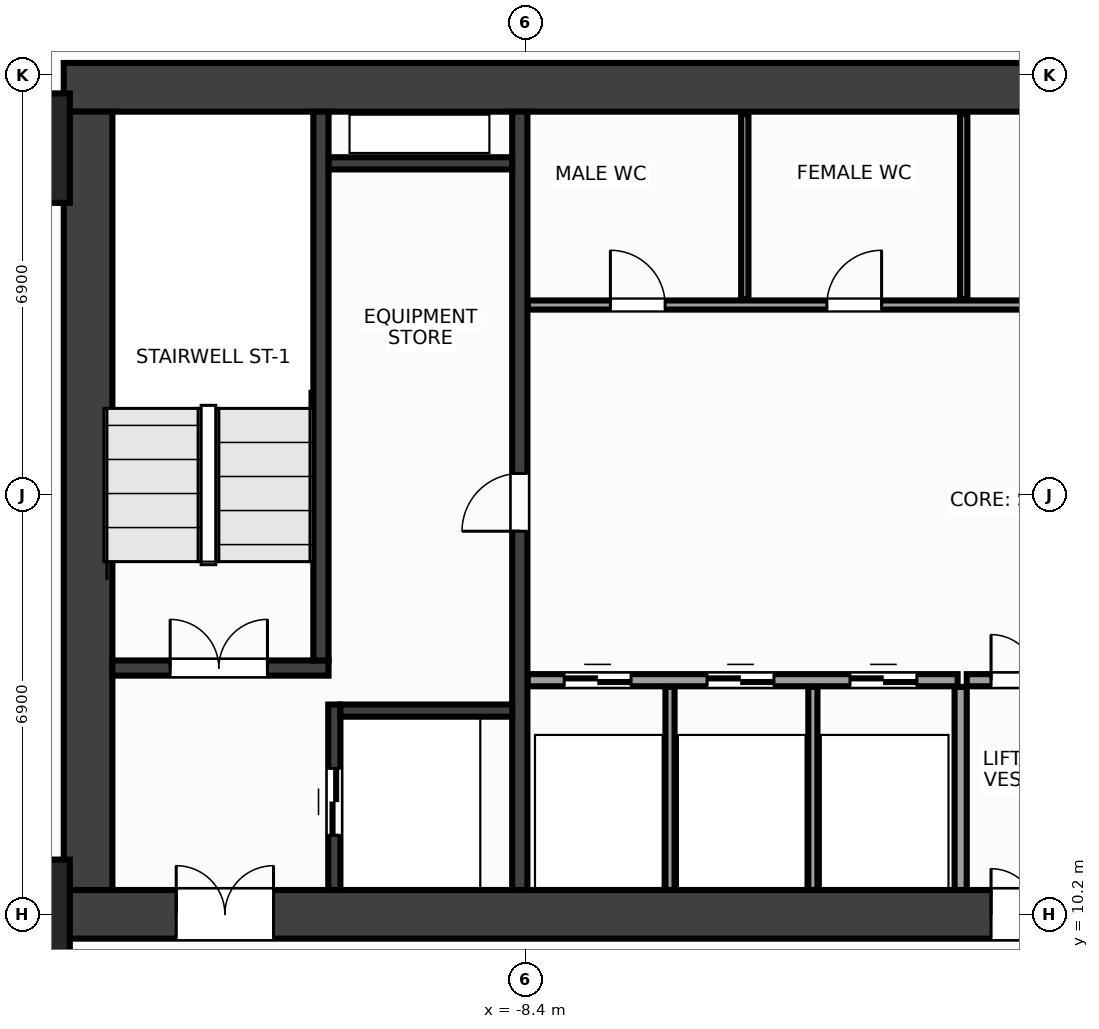
"""IFC4 building model, lengths in metres.
Left out: names, types, materials, properties, quantities, classifications, styles, units other than length and angle.
Written with IfcOpenShell. Run it as: python <this file> out.ifc"""

import sys

from ifc_helpers import new_model, si_unit, direction, frame, frame_2d, origin, origin_2d, place, context, subcontext, project, spatial, rectangle, extrude, source, transform, mapped, element, fill, save


model = new_model("IFC4")
c1 = context("Model", 3, precision=1e-05, world=origin(), true_north=direction((0.0, 1.0)))
c2 = subcontext(c1, "Body", "Model", "MODEL_VIEW")
j1 = project(units=[si_unit("LENGTHUNIT", "METRE"), si_unit("PLANEANGLEUNIT", "RADIAN")], contexts=[c1])
p1 = place(None, origin())
s1 = spatial("IfcSite", under=j1, at=p1, CompositionType="ELEMENT")
p2 = place(p1, origin())
s2 = spatial("IfcBuilding", under=s1, at=p2, CompositionType="ELEMENT")
p3 = place(p2, frame((0.0, 0.0, 27.2)))
s3 = spatial("IfcBuildingStorey", under=s2, at=p3, CompositionType="ELEMENT", Elevation=27.2)
m1 = source(origin(), c2, "Body", "SweptSolid", [
    extrude(rectangle(XDim=32.0, YDim=0.8, at=frame_2d((16.0, 0.0))), origin(), (0.0, 0.0, 1.0), 3.6),
])
p4 = place(p3, frame((-16.0, 23.8, 0.0), z_axis=(0.0, 0.0, 1.0), x_axis=(1.0, 0.0, 0.0)))
e1 = element("IfcWall", 1, at=p4, inside=s3, PredefinedType="SHEAR", context=c2, shape_type="MappedRepresentation", body=[
    mapped(m1, transform((0.0, 0.0, 0.0), x_axis=(1.0, 0.0, 0.0), y_axis=(0.0, 1.0, 0.0), z_axis=(0.0, 0.0, 1.0), scale=1.0)),
])
p5 = place(p3, frame((-16.0, 10.2, 0.0), z_axis=(0.0, 0.0, 1.0), x_axis=(1.0, 0.0, 0.0)))
e2 = element("IfcWall", 2, at=p5, inside=s3, PredefinedType="SHEAR", context=c2, shape_type="MappedRepresentation", body=[
    mapped(m1, transform((0.0, 0.0, 0.0), x_axis=(1.0, 0.0, 0.0), y_axis=(0.0, 1.0, 0.0), z_axis=(0.0, 0.0, 1.0), scale=1.0)),
])
p6 = place(p5, frame((1.85, 0.0, 0.0)))
e3 = element("IfcOpeningElement", 3, at=p6, cuts=e2, PredefinedType="OPENING", context=c2, shape_type="SweptSolid", body=[
    extrude(rectangle(XDim=1.6, YDim=2.15, at=frame_2d((0.8, 1.075))), frame((0.0, 0.412, 0.0), z_axis=(0.0, -1.0, 0.0), x_axis=(1.0, 0.0, 0.0)), (0.0, 0.0, 1.0), 0.824),
])
p7 = place(p5, frame((28.55, 0.0, 0.0)))
e4 = element("IfcOpeningElement", 4, at=p7, cuts=e2, PredefinedType="OPENING", context=c2, shape_type="SweptSolid", body=[
    extrude(rectangle(XDim=1.6, YDim=2.15, at=frame_2d((0.8, 1.075))), frame((0.0, 0.412, 0.0), z_axis=(0.0, -1.0, 0.0), x_axis=(1.0, 0.0, 0.0)), (0.0, 0.0, 1.0), 0.824),
])
p8 = place(p5, frame((15.25, 0.0, 0.0)))
e5 = element("IfcOpeningElement", 5, at=p8, cuts=e2, PredefinedType="OPENING", context=c2, shape_type="SweptSolid", body=[
    extrude(rectangle(XDim=1.5, YDim=2.2, at=frame_2d((0.75, 1.1))), frame((0.0, 0.412, 0.0), z_axis=(0.0, -1.0, 0.0), x_axis=(1.0, 0.0, 0.0)), (0.0, 0.0, 1.0), 0.824),
])
m2 = source(origin(), c2, "Body", "SweptSolid", [
    extrude(rectangle(XDim=12.8, YDim=0.8, at=frame_2d((6.4, 0.0))), origin(), (0.0, 0.0, 1.0), 3.6),
])
p9 = place(p3, frame((-15.6, 10.6, 0.0), z_axis=(0.0, 0.0, 1.0), x_axis=(0.0, 1.0, 0.0)))
e6 = element("IfcWall", 6, at=p9, inside=s3, PredefinedType="SHEAR", context=c2, shape_type="MappedRepresentation", body=[
    mapped(m2, transform((0.0, 0.0, 0.0), x_axis=(1.0, 0.0, 0.0), y_axis=(0.0, 1.0, 0.0), z_axis=(0.0, 0.0, 1.0), scale=1.0)),
])
m3 = source(origin(), c2, "Body", "SweptSolid", [
    extrude(rectangle(XDim=12.8, YDim=0.25, at=frame_2d((6.4, 0.0))), origin(), (0.0, 0.0, 1.0), 3.6),
])
p10 = place(p3, frame((-8.5, 10.6, 0.0), z_axis=(0.0, 0.0, 1.0), x_axis=(0.0, 1.0, 0.0)))
e7 = element("IfcWall", 7, at=p10, inside=s3, PredefinedType="SHEAR", context=c2, shape_type="MappedRepresentation", body=[
    mapped(m3, transform((0.0, 0.0, 0.0), x_axis=(1.0, 0.0, 0.0), y_axis=(0.0, 1.0, 0.0), z_axis=(0.0, 0.0, 1.0), scale=1.0)),
])
p11 = place(p10, frame((5.9, 0.0, 0.0)))
e8 = element("IfcOpeningElement", 8, at=p11, cuts=e7, PredefinedType="OPENING", context=c2, shape_type="SweptSolid", body=[
    extrude(rectangle(XDim=0.95, YDim=2.15, at=frame_2d((0.475, 1.075))), frame((0.0, 0.137, 0.0), z_axis=(0.0, -1.0, 0.0), x_axis=(1.0, 0.0, 0.0)), (0.0, 0.0, 1.0), 0.274),
])
m4 = source(origin(), c2, "Body", "SweptSolid", [
    extrude(rectangle(XDim=3.555, YDim=0.25, at=frame_2d((1.777, 0.0))), origin(), (0.0, 0.0, 1.0), 3.6),
])
p12 = place(p3, frame((-15.2, 14.25, 0.0), z_axis=(0.0, 0.0, 1.0), x_axis=(1.0, 0.0, 0.0)))
e9 = element("IfcWall", 9, at=p12, inside=s3, PredefinedType="SHEAR", context=c2, shape_type="MappedRepresentation", body=[
    mapped(m4, transform((0.0, 0.0, 0.0), x_axis=(1.0, 0.0, 0.0), y_axis=(0.0, 1.0, 0.0), z_axis=(0.0, 0.0, 1.0), scale=1.0)),
])
p13 = place(p12, frame((0.95, 0.0, 0.0)))
e10 = element("IfcOpeningElement", 10, at=p13, cuts=e9, PredefinedType="OPENING", context=c2, shape_type="SweptSolid", body=[
    extrude(rectangle(XDim=1.6, YDim=2.15, at=frame_2d((0.8, 1.075))), frame((0.0, 0.137, 0.0), z_axis=(0.0, -1.0, 0.0), x_axis=(1.0, 0.0, 0.0)), (0.0, 0.0, 1.0), 0.274),
])
m5 = source(origin(), c2, "Body", "SweptSolid", [
    extrude(rectangle(XDim=9.025, YDim=0.25, at=frame_2d((4.512, 0.0))), origin(), (0.0, 0.0, 1.0), 3.6),
])
p14 = place(p3, frame((-11.77, 14.375, 0.0), z_axis=(0.0, 0.0, 1.0), x_axis=(0.0, 1.0, 0.0)))
e11 = element("IfcWall", 11, at=p14, inside=s3, PredefinedType="SHEAR", context=c2, shape_type="MappedRepresentation", body=[
    mapped(m5, transform((0.0, 0.0, 0.0), x_axis=(1.0, 0.0, 0.0), y_axis=(0.0, 1.0, 0.0), z_axis=(0.0, 0.0, 1.0), scale=1.0)),
])
m6 = source(origin(), c2, "Body", "SweptSolid", [
    extrude(rectangle(XDim=3.05, YDim=0.2, at=frame_2d((1.525, 0.0))), origin(), (0.0, 0.0, 1.0), 3.6),
])
p15 = place(p3, frame((-11.55, 10.6, 0.0), z_axis=(0.0, 0.0, 1.0), x_axis=(0.0, 1.0, 0.0)))
e12 = element("IfcWall", 12, at=p15, inside=s3, PredefinedType="SHEAR", context=c2, shape_type="MappedRepresentation", body=[
    mapped(m6, transform((0.0, 0.0, 0.0), x_axis=(1.0, 0.0, 0.0), y_axis=(0.0, 1.0, 0.0), z_axis=(0.0, 0.0, 1.0), scale=1.0)),
])
p16 = place(p15, frame((0.9, 0.0, 0.0)))
e13 = element("IfcOpeningElement", 13, at=p16, cuts=e12, PredefinedType="OPENING", context=c2, shape_type="SweptSolid", body=[
    extrude(rectangle(XDim=1.1, YDim=2.15, at=frame_2d((0.55, 1.075))), frame((0.0, 0.112, 0.0), z_axis=(0.0, -1.0, 0.0), x_axis=(1.0, 0.0, 0.0)), (0.0, 0.0, 1.0), 0.224),
])
m7 = source(origin(), c2, "Body", "SweptSolid", [
    extrude(rectangle(XDim=2.825, YDim=0.2, at=frame_2d((1.413, 0.0))), origin(), (0.0, 0.0, 1.0), 3.6),
])
p17 = place(p3, frame((-11.45, 13.55, 0.0), z_axis=(0.0, 0.0, 1.0), x_axis=(1.0, 0.0, 0.0)))
e14 = element("IfcWall", 14, at=p17, inside=s3, PredefinedType="SHEAR", context=c2, shape_type="MappedRepresentation", body=[
    mapped(m7, transform((0.0, 0.0, 0.0), x_axis=(1.0, 0.0, 0.0), y_axis=(0.0, 1.0, 0.0), z_axis=(0.0, 0.0, 1.0), scale=1.0)),
])
m8 = source(origin(), c2, "Body", "SweptSolid", [
    extrude(rectangle(XDim=3.02, YDim=0.2, at=frame_2d((1.51, 0.0))), origin(), (0.0, 0.0, 1.0), 3.6),
])
p18 = place(p3, frame((-11.645, 22.55, 0.0), z_axis=(0.0, 0.0, 1.0), x_axis=(1.0, 0.0, 0.0)))
e15 = element("IfcWall", 15, at=p18, inside=s3, PredefinedType="SHEAR", context=c2, shape_type="MappedRepresentation", body=[
    mapped(m8, transform((0.0, 0.0, 0.0), x_axis=(1.0, 0.0, 0.0), y_axis=(0.0, 1.0, 0.0), z_axis=(0.0, 0.0, 1.0), scale=1.0)),
])
m9 = source(origin(), c2, "Body", "SweptSolid", [
    extrude(rectangle(XDim=1.8, YDim=1.8, at=origin_2d()), origin(), (0.0, 0.0, 1.0), 3.6),
])
for number, where, z_axis, x_axis in (
    (16, (-16.8, 10.2, 0.0), (0.0, 0.0, 1.0), (1.0, 0.0, 0.0)),
    (17, (-16.8, 22.8, 0.0), (0.0, 0.0, 1.0), (1.0, 0.0, 0.0)),
):
    element("IfcColumn", number, at=place(p3, frame(where, z_axis=z_axis, x_axis=x_axis)), inside=s3, PredefinedType="COLUMN", context=c2, shape_type="MappedRepresentation", body=[
        mapped(m9, transform((0.0, 0.0, 0.0), x_axis=(1.0, 0.0, 0.0), y_axis=(0.0, 1.0, 0.0), z_axis=(0.0, 0.0, 1.0), scale=1.0)),
    ])
m10 = source(origin(), c2, "Body", "SweptSolid", [
    extrude(rectangle(XDim=7.07, YDim=0.2, at=frame_2d((3.535, 0.0))), origin(), (0.0, 0.0, 1.0), 3.36),
])
p19 = place(p3, frame((-8.37, 14.05, 0.0), z_axis=(0.0, 0.0, 1.0), x_axis=(1.0, 0.0, 0.0)))
e18 = element("IfcWall", 18, at=p19, inside=s3, PredefinedType="PARTITIONING", context=c2, shape_type="MappedRepresentation", body=[
    mapped(m10, transform((0.0, 0.0, 0.0), x_axis=(1.0, 0.0, 0.0), y_axis=(0.0, 1.0, 0.0), z_axis=(0.0, 0.0, 1.0), scale=1.0)),
])
p20 = place(p19, frame((0.6, 0.0, 0.0)))
e19 = element("IfcOpeningElement", 19, at=p20, cuts=e18, PredefinedType="OPENING", context=c2, shape_type="SweptSolid", body=[
    extrude(rectangle(XDim=1.1, YDim=2.15, at=frame_2d((0.55, 1.075))), frame((0.0, 0.112, 0.0), z_axis=(0.0, -1.0, 0.0), x_axis=(1.0, 0.0, 0.0)), (0.0, 0.0, 1.0), 0.224),
])
p21 = place(p19, frame((2.95, 0.0, 0.0)))
e20 = element("IfcOpeningElement", 20, at=p21, cuts=e18, PredefinedType="OPENING", context=c2, shape_type="SweptSolid", body=[
    extrude(rectangle(XDim=1.1, YDim=2.15, at=frame_2d((0.55, 1.075))), frame((0.0, 0.112, 0.0), z_axis=(0.0, -1.0, 0.0), x_axis=(1.0, 0.0, 0.0)), (0.0, 0.0, 1.0), 0.224),
])
p22 = place(p19, frame((5.3, 0.0, 0.0)))
e21 = element("IfcOpeningElement", 21, at=p22, cuts=e18, PredefinedType="OPENING", context=c2, shape_type="SweptSolid", body=[
    extrude(rectangle(XDim=1.1, YDim=2.15, at=frame_2d((0.55, 1.075))), frame((0.0, 0.112, 0.0), z_axis=(0.0, -1.0, 0.0), x_axis=(1.0, 0.0, 0.0)), (0.0, 0.0, 1.0), 0.224),
])
m11 = source(origin(), c2, "Body", "SweptSolid", [
    extrude(rectangle(XDim=3.34, YDim=0.2, at=frame_2d((1.67, 0.0))), origin(), (0.0, 0.0, 1.0), 3.36),
])
p23 = place(p3, frame((-1.25, 10.6, 0.0), z_axis=(0.0, 0.0, 1.0), x_axis=(0.0, 1.0, 0.0)))
e22 = element("IfcWall", 22, at=p23, inside=s3, PredefinedType="PARTITIONING", context=c2, shape_type="MappedRepresentation", body=[
    mapped(m11, transform((0.0, 0.0, 0.0), x_axis=(1.0, 0.0, 0.0), y_axis=(0.0, 1.0, 0.0), z_axis=(0.0, 0.0, 1.0), scale=1.0)),
])
m12 = source(origin(), c2, "Body", "SweptSolid", [
    extrude(rectangle(XDim=2.3, YDim=0.2, at=frame_2d((1.15, 0.0))), origin(), (0.0, 0.0, 1.0), 3.36),
])
p24 = place(p3, frame((-1.15, 14.05, 0.0), z_axis=(0.0, 0.0, 1.0), x_axis=(1.0, 0.0, 0.0)))
e23 = element("IfcWall", 23, at=p24, inside=s3, PredefinedType="PARTITIONING", context=c2, shape_type="MappedRepresentation", body=[
    mapped(m12, transform((0.0, 0.0, 0.0), x_axis=(1.0, 0.0, 0.0), y_axis=(0.0, 1.0, 0.0), z_axis=(0.0, 0.0, 1.0), scale=1.0)),
])
p25 = place(p24, frame((0.4, 0.0, 0.0)))
e24 = element("IfcOpeningElement", 24, at=p25, cuts=e23, PredefinedType="OPENING", context=c2, shape_type="SweptSolid", body=[
    extrude(rectangle(XDim=1.5, YDim=2.2, at=frame_2d((0.75, 1.1))), frame((0.0, 0.112, 0.0), z_axis=(0.0, -1.0, 0.0), x_axis=(1.0, 0.0, 0.0)), (0.0, 0.0, 1.0), 0.224),
])
m13 = source(origin(), c2, "Body", "SweptSolid", [
    extrude(rectangle(XDim=14.59, YDim=0.15, at=frame_2d((7.295, 0.0))), origin(), (0.0, 0.0, 1.0), 3.36),
])
p26 = place(p3, frame((-8.37, 20.22, 0.0), z_axis=(0.0, 0.0, 1.0), x_axis=(1.0, 0.0, 0.0)))
e25 = element("IfcWall", 25, at=p26, inside=s3, PredefinedType="PARTITIONING", context=c2, shape_type="MappedRepresentation", body=[
    mapped(m13, transform((0.0, 0.0, 0.0), x_axis=(1.0, 0.0, 0.0), y_axis=(0.0, 1.0, 0.0), z_axis=(0.0, 0.0, 1.0), scale=1.0)),
])
p27 = place(p26, frame((1.36, 0.0, 0.0)))
e26 = element("IfcOpeningElement", 26, at=p27, cuts=e25, PredefinedType="OPENING", context=c2, shape_type="SweptSolid", body=[
    extrude(rectangle(XDim=0.9, YDim=2.15, at=frame_2d((0.45, 1.075))), frame((0.0, 0.087, 0.0), z_axis=(0.0, -1.0, 0.0), x_axis=(1.0, 0.0, 0.0)), (0.0, 0.0, 1.0), 0.174),
])
p28 = place(p26, frame((4.92, 0.0, 0.0)))
e27 = element("IfcOpeningElement", 27, at=p28, cuts=e25, PredefinedType="OPENING", context=c2, shape_type="SweptSolid", body=[
    extrude(rectangle(XDim=0.9, YDim=2.15, at=frame_2d((0.45, 1.075))), frame((0.0, 0.087, 0.0), z_axis=(0.0, -1.0, 0.0), x_axis=(1.0, 0.0, 0.0)), (0.0, 0.0, 1.0), 0.174),
])
p29 = place(p26, frame((10.37, 0.0, 0.0)))
e28 = element("IfcOpeningElement", 28, at=p29, cuts=e25, PredefinedType="OPENING", context=c2, shape_type="SweptSolid", body=[
    extrude(rectangle(XDim=0.9, YDim=2.15, at=frame_2d((0.45, 1.075))), frame((0.0, 0.087, 0.0), z_axis=(0.0, -1.0, 0.0), x_axis=(1.0, 0.0, 0.0)), (0.0, 0.0, 1.0), 0.174),
])
m14 = source(origin(), c2, "Body", "SweptSolid", [
    extrude(rectangle(XDim=3.34, YDim=0.15, at=frame_2d((1.67, 0.0))), origin(), (0.0, 0.0, 1.0), 3.36),
])
for number, where, z_axis, x_axis in (
    (29, (-6.03, 10.6, 0.0), (0.0, 0.0, 1.0), (0.0, 1.0, 0.0)),
    (30, (-3.68, 10.6, 0.0), (0.0, 0.0, 1.0), (0.0, 1.0, 0.0)),
):
    element("IfcWall", number, at=place(p3, frame(where, z_axis=z_axis, x_axis=x_axis)), inside=s3, PredefinedType="PARTITIONING", context=c2, shape_type="MappedRepresentation", body=[
        mapped(m14, transform((0.0, 0.0, 0.0), x_axis=(1.0, 0.0, 0.0), y_axis=(0.0, 1.0, 0.0), z_axis=(0.0, 0.0, 1.0), scale=1.0)),
    ])
m15 = source(origin(), c2, "Body", "SweptSolid", [
    extrude(rectangle(XDim=3.04, YDim=0.12, at=frame_2d((1.52, 0.0))), origin(), (0.0, 0.0, 1.0), 3.36),
])
for number, where, z_axis, x_axis in (
    (31, (-4.8, 20.32, 0.0), (0.0, 0.0, 1.0), (0.0, 1.0, 0.0)),
    (32, (-1.2, 20.32, 0.0), (0.0, 0.0, 1.0), (0.0, 1.0, 0.0)),
):
    element("IfcWall", number, at=place(p3, frame(where, z_axis=z_axis, x_axis=x_axis)), inside=s3, PredefinedType="PARTITIONING", context=c2, shape_type="MappedRepresentation", body=[
        mapped(m15, transform((0.0, 0.0, 0.0), x_axis=(1.0, 0.0, 0.0), y_axis=(0.0, 1.0, 0.0), z_axis=(0.0, 0.0, 1.0), scale=1.0)),
    ])
m16 = source(origin(), c2, "Body", "SweptSolid", [
    extrude(rectangle(XDim=1.6, YDim=2.15, at=frame_2d((0.8, 1.075))), frame((0.0, 0.025, 0.0), z_axis=(0.0, -1.0, 0.0), x_axis=(1.0, 0.0, 0.0)), (0.0, 0.0, 1.0), 0.05),
])
p30 = place(p13, origin())
e33 = element("IfcDoor", 33, at=p30, inside=s3, OperationType="DOUBLE_DOOR_SINGLE_SWING", PredefinedType="DOOR", context=c2, shape_type="MappedRepresentation", body=[
    mapped(m16, transform((0.0, 0.0, 0.0), x_axis=(1.0, 0.0, 0.0), y_axis=(0.0, 1.0, 0.0), z_axis=(0.0, 0.0, 1.0), scale=1.0)),
])
fill(e10, e33)
p31 = place(p6, origin())
e34 = element("IfcDoor", 34, at=p31, inside=s3, OperationType="DOUBLE_DOOR_SINGLE_SWING", PredefinedType="DOOR", context=c2, shape_type="MappedRepresentation", body=[
    mapped(m16, transform((0.0, 0.0, 0.0), x_axis=(1.0, 0.0, 0.0), y_axis=(0.0, 1.0, 0.0), z_axis=(0.0, 0.0, 1.0), scale=1.0)),
])
fill(e3, e34)
m17 = source(origin(), c2, "Body", "SweptSolid", [
    extrude(rectangle(XDim=1.1, YDim=2.15, at=frame_2d((0.55, 1.075))), frame((0.0, 0.025, 0.0), z_axis=(0.0, -1.0, 0.0), x_axis=(1.0, 0.0, 0.0)), (0.0, 0.0, 1.0), 0.05),
])
p32 = place(p16, origin())
e35 = element("IfcDoor", 35, at=p32, inside=s3, OperationType="DOUBLE_DOOR_SLIDING", PredefinedType="DOOR", context=c2, shape_type="MappedRepresentation", body=[
    mapped(m17, transform((0.0, 0.0, 0.0), x_axis=(1.0, 0.0, 0.0), y_axis=(0.0, 1.0, 0.0), z_axis=(0.0, 0.0, 1.0), scale=1.0)),
])
fill(e13, e35)
m18 = source(origin(), c2, "Body", "SweptSolid", [
    extrude(rectangle(XDim=0.95, YDim=2.15, at=frame_2d((0.475, 1.075))), frame((0.0, 0.025, 0.0), z_axis=(0.0, -1.0, 0.0), x_axis=(1.0, 0.0, 0.0)), (0.0, 0.0, 1.0), 0.05),
])
p33 = place(p11, origin())
e36 = element("IfcDoor", 36, at=p33, inside=s3, OperationType="SINGLE_SWING_LEFT", PredefinedType="DOOR", context=c2, shape_type="MappedRepresentation", body=[
    mapped(m18, transform((0.0, 0.0, 0.0), x_axis=(1.0, 0.0, 0.0), y_axis=(0.0, 1.0, 0.0), z_axis=(0.0, 0.0, 1.0), scale=1.0)),
])
fill(e8, e36)
p34 = place(p20, origin())
e37 = element("IfcDoor", 37, at=p34, inside=s3, OperationType="DOUBLE_DOOR_SLIDING", PredefinedType="DOOR", context=c2, shape_type="MappedRepresentation", body=[
    mapped(m17, transform((0.0, 0.0, 0.0), x_axis=(1.0, 0.0, 0.0), y_axis=(0.0, 1.0, 0.0), z_axis=(0.0, 0.0, 1.0), scale=1.0)),
])
fill(e19, e37)
p35 = place(p21, origin())
e38 = element("IfcDoor", 38, at=p35, inside=s3, OperationType="DOUBLE_DOOR_SLIDING", PredefinedType="DOOR", context=c2, shape_type="MappedRepresentation", body=[
    mapped(m17, transform((0.0, 0.0, 0.0), x_axis=(1.0, 0.0, 0.0), y_axis=(0.0, 1.0, 0.0), z_axis=(0.0, 0.0, 1.0), scale=1.0)),
])
fill(e20, e38)
p36 = place(p22, origin())
e39 = element("IfcDoor", 39, at=p36, inside=s3, OperationType="DOUBLE_DOOR_SLIDING", PredefinedType="DOOR", context=c2, shape_type="MappedRepresentation", body=[
    mapped(m17, transform((0.0, 0.0, 0.0), x_axis=(1.0, 0.0, 0.0), y_axis=(0.0, 1.0, 0.0), z_axis=(0.0, 0.0, 1.0), scale=1.0)),
])
fill(e21, e39)
m19 = source(origin(), c2, "Body", "SweptSolid", [
    extrude(rectangle(XDim=1.5, YDim=2.2, at=frame_2d((0.75, 1.1))), frame((0.0, 0.025, 0.0), z_axis=(0.0, -1.0, 0.0), x_axis=(1.0, 0.0, 0.0)), (0.0, 0.0, 1.0), 0.05),
])
p37 = place(p25, origin())
e40 = element("IfcDoor", 40, at=p37, inside=s3, OperationType="DOUBLE_DOOR_SINGLE_SWING", PredefinedType="DOOR", context=c2, shape_type="MappedRepresentation", body=[
    mapped(m19, transform((0.0, 0.0, 0.0), x_axis=(1.0, 0.0, 0.0), y_axis=(0.0, 1.0, 0.0), z_axis=(0.0, 0.0, 1.0), scale=1.0)),
])
fill(e24, e40)
p38 = place(p8, origin())
e41 = element("IfcDoor", 41, at=p38, inside=s3, OperationType="DOUBLE_DOOR_SINGLE_SWING", PredefinedType="DOOR", context=c2, shape_type="MappedRepresentation", body=[
    mapped(m19, transform((0.0, 0.0, 0.0), x_axis=(1.0, 0.0, 0.0), y_axis=(0.0, 1.0, 0.0), z_axis=(0.0, 0.0, 1.0), scale=1.0)),
])
fill(e5, e41)
m20 = source(origin(), c2, "Body", "SweptSolid", [
    extrude(rectangle(XDim=0.9, YDim=2.15, at=frame_2d((0.45, 1.075))), frame((0.0, 0.025, 0.0), z_axis=(0.0, -1.0, 0.0), x_axis=(1.0, 0.0, 0.0)), (0.0, 0.0, 1.0), 0.05),
])
p39 = place(p27, origin())
e42 = element("IfcDoor", 42, at=p39, inside=s3, OperationType="SINGLE_SWING_LEFT", PredefinedType="DOOR", context=c2, shape_type="MappedRepresentation", body=[
    mapped(m20, transform((0.0, 0.0, 0.0), x_axis=(1.0, 0.0, 0.0), y_axis=(0.0, 1.0, 0.0), z_axis=(0.0, 0.0, 1.0), scale=1.0)),
])
fill(e26, e42)
p40 = place(p28, origin())
e43 = element("IfcDoor", 43, at=p40, inside=s3, OperationType="SINGLE_SWING_RIGHT", PredefinedType="DOOR", context=c2, shape_type="MappedRepresentation", body=[
    mapped(m20, transform((0.0, 0.0, 0.0), x_axis=(1.0, 0.0, 0.0), y_axis=(0.0, 1.0, 0.0), z_axis=(0.0, 0.0, 1.0), scale=1.0)),
])
fill(e27, e43)
save(model, sys.argv[1])
